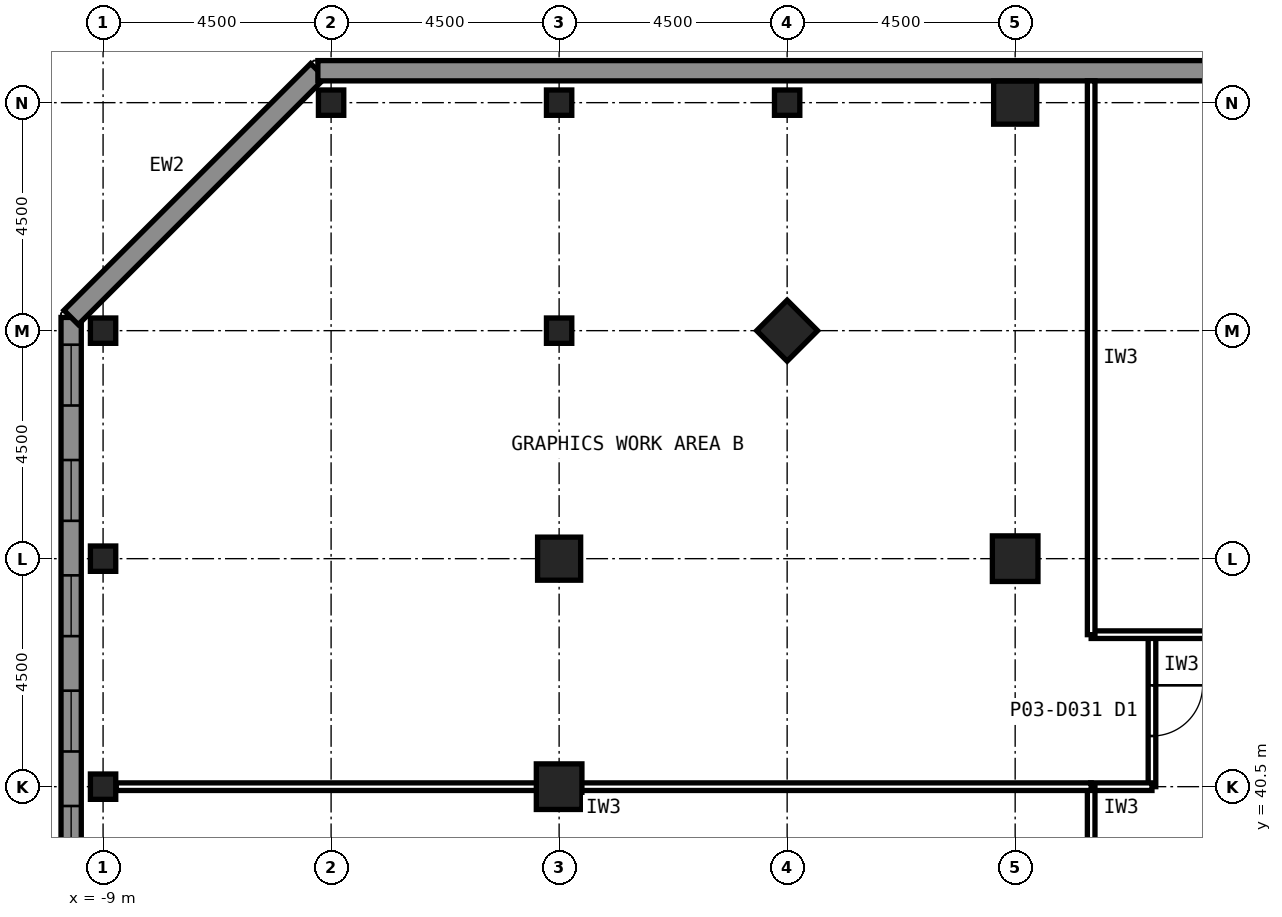
"""IFC4 building model, lengths in metres.
Left out: names, types, materials, properties, quantities, classifications, styles, units other than length and angle.
Written with IfcOpenShell. Run it as: python <this file> out.ifc"""

import sys

from ifc_helpers import new_model, si_unit, direction, frame, frame_2d, origin, origin_2d, place, context, subcontext, project, spatial, rectangle, hollow_rectangle, extrude, element, fill, save


model = new_model("IFC4")
c1 = context("Model", 3, precision=1e-05, world=origin(), true_north=direction((0.0, 1.0)))
c2 = subcontext(c1, "Body", "Model", "MODEL_VIEW")
j1 = project(units=[si_unit("LENGTHUNIT", "METRE"), si_unit("PLANEANGLEUNIT", "RADIAN")], contexts=[c1])
p1 = place(None, origin())
s1 = spatial("IfcSite", under=j1, at=p1, CompositionType="ELEMENT")
p2 = place(p1, origin())
s2 = spatial("IfcBuilding", under=s1, at=p2, CompositionType="ELEMENT")
p3 = place(p2, frame((0.0, 0.0, 12.0)))
s3 = spatial("IfcBuildingStorey", under=s2, at=p3, CompositionType="ELEMENT", Elevation=12.0)
for number, where, z_axis, x_axis in (
    (1, (9.0, 54.0, 0.0), (0.0, 0.0, 1.0), (1.0, 0.0, 0.0)),
    (2, (0.0, 45.0, 0.0), (0.0, 0.0, 1.0), (1.0, 0.0, 0.0)),
):
    element("IfcColumn", number, at=place(p3, frame(where, z_axis=z_axis, x_axis=x_axis)), inside=s3, PredefinedType="COLUMN", context=c2, shape_type="SweptSolid", body=[
        extrude(hollow_rectangle(XDim=0.85, YDim=0.85, WallThickness=0.05, at=origin_2d()), origin(), (0.0, 0.0, 1.0), 6.0),
    ])
p4 = place(p3, frame((0.0, 40.5, 0.0), z_axis=(0.0, 0.0, 1.0), x_axis=(1.0, 0.0, 0.0)))
e3 = element("IfcColumn", 3, at=p4, inside=s3, PredefinedType="COLUMN", context=c2, shape_type="SweptSolid", body=[
    extrude(hollow_rectangle(XDim=0.9, YDim=0.9, WallThickness=0.063, at=origin_2d()), origin(), (0.0, 0.0, 1.0), 6.0),
])
p5 = place(p3, frame((4.5, 49.5, 0.0), z_axis=(0.0, 0.0, 1.0), x_axis=(0.707106781187, 0.707106781187, 0.0)))
e4 = element("IfcColumn", 4, at=p5, inside=s3, PredefinedType="COLUMN", context=c2, shape_type="SweptSolid", body=[
    extrude(hollow_rectangle(XDim=0.85, YDim=0.85, WallThickness=0.05, at=origin_2d()), origin(), (0.0, 0.0, 1.0), 6.0),
])
p6 = place(p3, frame((9.0, 45.0, 0.0), z_axis=(0.0, 0.0, 1.0), x_axis=(1.0, 0.0, 0.0)))
e5 = element("IfcColumn", 5, at=p6, inside=s3, PredefinedType="COLUMN", context=c2, shape_type="SweptSolid", body=[
    extrude(hollow_rectangle(XDim=0.9, YDim=0.9, WallThickness=0.063, at=origin_2d()), origin(), (0.0, 0.0, 1.0), 6.0),
])
for number, where, z_axis, x_axis in (
    (6, (-9.0, 40.5, 0.0), (0.0, 0.0, 1.0), (1.0, 0.0, 0.0)),
    (7, (-9.0, 45.0, 0.0), (0.0, 0.0, 1.0), (1.0, 0.0, 0.0)),
    (8, (-9.0, 49.5, 0.0), (0.0, 0.0, 1.0), (1.0, 0.0, 0.0)),
    (9, (-4.5, 54.0, 0.0), (0.0, 0.0, 1.0), (1.0, 0.0, 0.0)),
    (10, (0.0, 54.0, 0.0), (0.0, 0.0, 1.0), (1.0, 0.0, 0.0)),
    (11, (4.5, 54.0, 0.0), (0.0, 0.0, 1.0), (1.0, 0.0, 0.0)),
    (12, (0.0, 49.5, 0.0), (0.0, 0.0, 1.0), (1.0, 0.0, 0.0)),
):
    element("IfcColumn", number, at=place(p3, frame(where, z_axis=z_axis, x_axis=x_axis)), inside=s3, PredefinedType="COLUMN", context=c2, shape_type="SweptSolid", body=[
        extrude(hollow_rectangle(XDim=0.5, YDim=0.5, WallThickness=0.022, at=origin_2d()), origin(), (0.0, 0.0, 1.0), 6.0),
    ])
p7 = place(p3, frame((-9.63, 4.239, 0.0), z_axis=(0.0, 0.0, 1.0), x_axis=(0.0, 1.0, 0.0)))
e13 = element("IfcWall", 13, at=p7, inside=s3, PredefinedType="SOLIDWALL", context=c2, shape_type="SweptSolid", body=[
    extrude(rectangle(XDim=45.522, YDim=0.4, at=frame_2d((22.761, 0.0))), origin(), (0.0, 0.0, 1.0), 6.0),
])
p8 = place(p7, frame((0.538, 0.0, 0.9)))
e14 = element("IfcOpeningElement", 14, at=p8, cuts=e13, PredefinedType="OPENING", context=c2, shape_type="SweptSolid", body=[
    extrude(rectangle(XDim=1.2, YDim=1.5, at=frame_2d((0.6, 0.75))), frame((0.0, 0.21, 0.0), z_axis=(0.0, -1.0, 0.0), x_axis=(1.0, 0.0, 0.0)), (0.0, 0.0, 1.0), 0.42),
])
p9 = place(p7, frame((2.814, 0.0, 0.9)))
e15 = element("IfcOpeningElement", 15, at=p9, cuts=e13, PredefinedType="OPENING", context=c2, shape_type="SweptSolid", body=[
    extrude(rectangle(XDim=1.2, YDim=1.5, at=frame_2d((0.6, 0.75))), frame((0.0, 0.21, 0.0), z_axis=(0.0, -1.0, 0.0), x_axis=(1.0, 0.0, 0.0)), (0.0, 0.0, 1.0), 0.42),
])
p10 = place(p7, frame((5.09, 0.0, 0.9)))
e16 = element("IfcOpeningElement", 16, at=p10, cuts=e13, PredefinedType="OPENING", context=c2, shape_type="SweptSolid", body=[
    extrude(rectangle(XDim=1.2, YDim=1.5, at=frame_2d((0.6, 0.75))), frame((0.0, 0.21, 0.0), z_axis=(0.0, -1.0, 0.0), x_axis=(1.0, 0.0, 0.0)), (0.0, 0.0, 1.0), 0.42),
])
p11 = place(p7, frame((7.366, 0.0, 0.9)))
e17 = element("IfcOpeningElement", 17, at=p11, cuts=e13, PredefinedType="OPENING", context=c2, shape_type="SweptSolid", body=[
    extrude(rectangle(XDim=1.2, YDim=1.5, at=frame_2d((0.6, 0.75))), frame((0.0, 0.21, 0.0), z_axis=(0.0, -1.0, 0.0), x_axis=(1.0, 0.0, 0.0)), (0.0, 0.0, 1.0), 0.42),
])
p12 = place(p7, frame((9.642, 0.0, 0.9)))
e18 = element("IfcOpeningElement", 18, at=p12, cuts=e13, PredefinedType="OPENING", context=c2, shape_type="SweptSolid", body=[
    extrude(rectangle(XDim=1.2, YDim=1.5, at=frame_2d((0.6, 0.75))), frame((0.0, 0.21, 0.0), z_axis=(0.0, -1.0, 0.0), x_axis=(1.0, 0.0, 0.0)), (0.0, 0.0, 1.0), 0.42),
])
p13 = place(p7, frame((11.918, 0.0, 0.9)))
e19 = element("IfcOpeningElement", 19, at=p13, cuts=e13, PredefinedType="OPENING", context=c2, shape_type="SweptSolid", body=[
    extrude(rectangle(XDim=1.2, YDim=1.5, at=frame_2d((0.6, 0.75))), frame((0.0, 0.21, 0.0), z_axis=(0.0, -1.0, 0.0), x_axis=(1.0, 0.0, 0.0)), (0.0, 0.0, 1.0), 0.42),
])
p14 = place(p7, frame((14.195, 0.0, 0.9)))
e20 = element("IfcOpeningElement", 20, at=p14, cuts=e13, PredefinedType="OPENING", context=c2, shape_type="SweptSolid", body=[
    extrude(rectangle(XDim=1.2, YDim=1.5, at=frame_2d((0.6, 0.75))), frame((0.0, 0.21, 0.0), z_axis=(0.0, -1.0, 0.0), x_axis=(1.0, 0.0, 0.0)), (0.0, 0.0, 1.0), 0.42),
])
p15 = place(p7, frame((16.471, 0.0, 0.9)))
e21 = element("IfcOpeningElement", 21, at=p15, cuts=e13, PredefinedType="OPENING", context=c2, shape_type="SweptSolid", body=[
    extrude(rectangle(XDim=1.2, YDim=1.5, at=frame_2d((0.6, 0.75))), frame((0.0, 0.21, 0.0), z_axis=(0.0, -1.0, 0.0), x_axis=(1.0, 0.0, 0.0)), (0.0, 0.0, 1.0), 0.42),
])
p16 = place(p7, frame((18.747, 0.0, 0.9)))
e22 = element("IfcOpeningElement", 22, at=p16, cuts=e13, PredefinedType="OPENING", context=c2, shape_type="SweptSolid", body=[
    extrude(rectangle(XDim=1.2, YDim=1.5, at=frame_2d((0.6, 0.75))), frame((0.0, 0.21, 0.0), z_axis=(0.0, -1.0, 0.0), x_axis=(1.0, 0.0, 0.0)), (0.0, 0.0, 1.0), 0.42),
])
p17 = place(p7, frame((21.023, 0.0, 0.9)))
e23 = element("IfcOpeningElement", 23, at=p17, cuts=e13, PredefinedType="OPENING", context=c2, shape_type="SweptSolid", body=[
    extrude(rectangle(XDim=1.2, YDim=1.5, at=frame_2d((0.6, 0.75))), frame((0.0, 0.21, 0.0), z_axis=(0.0, -1.0, 0.0), x_axis=(1.0, 0.0, 0.0)), (0.0, 0.0, 1.0), 0.42),
])
p18 = place(p7, frame((23.299, 0.0, 0.9)))
e24 = element("IfcOpeningElement", 24, at=p18, cuts=e13, PredefinedType="OPENING", context=c2, shape_type="SweptSolid", body=[
    extrude(rectangle(XDim=1.2, YDim=1.5, at=frame_2d((0.6, 0.75))), frame((0.0, 0.21, 0.0), z_axis=(0.0, -1.0, 0.0), x_axis=(1.0, 0.0, 0.0)), (0.0, 0.0, 1.0), 0.42),
])
p19 = place(p7, frame((25.575, 0.0, 0.9)))
e25 = element("IfcOpeningElement", 25, at=p19, cuts=e13, PredefinedType="OPENING", context=c2, shape_type="SweptSolid", body=[
    extrude(rectangle(XDim=1.2, YDim=1.5, at=frame_2d((0.6, 0.75))), frame((0.0, 0.21, 0.0), z_axis=(0.0, -1.0, 0.0), x_axis=(1.0, 0.0, 0.0)), (0.0, 0.0, 1.0), 0.42),
])
p20 = place(p7, frame((27.851, 0.0, 0.9)))
e26 = element("IfcOpeningElement", 26, at=p20, cuts=e13, PredefinedType="OPENING", context=c2, shape_type="SweptSolid", body=[
    extrude(rectangle(XDim=1.2, YDim=1.5, at=frame_2d((0.6, 0.75))), frame((0.0, 0.21, 0.0), z_axis=(0.0, -1.0, 0.0), x_axis=(1.0, 0.0, 0.0)), (0.0, 0.0, 1.0), 0.42),
])
p21 = place(p7, frame((30.127, 0.0, 0.9)))
e27 = element("IfcOpeningElement", 27, at=p21, cuts=e13, PredefinedType="OPENING", context=c2, shape_type="SweptSolid", body=[
    extrude(rectangle(XDim=1.2, YDim=1.5, at=frame_2d((0.6, 0.75))), frame((0.0, 0.21, 0.0), z_axis=(0.0, -1.0, 0.0), x_axis=(1.0, 0.0, 0.0)), (0.0, 0.0, 1.0), 0.42),
])
p22 = place(p7, frame((32.404, 0.0, 0.9)))
e28 = element("IfcOpeningElement", 28, at=p22, cuts=e13, PredefinedType="OPENING", context=c2, shape_type="SweptSolid", body=[
    extrude(rectangle(XDim=1.2, YDim=1.5, at=frame_2d((0.6, 0.75))), frame((0.0, 0.21, 0.0), z_axis=(0.0, -1.0, 0.0), x_axis=(1.0, 0.0, 0.0)), (0.0, 0.0, 1.0), 0.42),
])
p23 = place(p7, frame((34.679, 0.0, 0.9)))
e29 = element("IfcOpeningElement", 29, at=p23, cuts=e13, PredefinedType="OPENING", context=c2, shape_type="SweptSolid", body=[
    extrude(rectangle(XDim=1.2, YDim=1.5, at=frame_2d((0.6, 0.75))), frame((0.0, 0.21, 0.0), z_axis=(0.0, -1.0, 0.0), x_axis=(1.0, 0.0, 0.0)), (0.0, 0.0, 1.0), 0.42),
])
p24 = place(p7, frame((36.956, 0.0, 0.9)))
e30 = element("IfcOpeningElement", 30, at=p24, cuts=e13, PredefinedType="OPENING", context=c2, shape_type="SweptSolid", body=[
    extrude(rectangle(XDim=1.2, YDim=1.5, at=frame_2d((0.6, 0.75))), frame((0.0, 0.21, 0.0), z_axis=(0.0, -1.0, 0.0), x_axis=(1.0, 0.0, 0.0)), (0.0, 0.0, 1.0), 0.42),
])
p25 = place(p7, frame((39.232, 0.0, 0.9)))
e31 = element("IfcOpeningElement", 31, at=p25, cuts=e13, PredefinedType="OPENING", context=c2, shape_type="SweptSolid", body=[
    extrude(rectangle(XDim=1.2, YDim=1.5, at=frame_2d((0.6, 0.75))), frame((0.0, 0.21, 0.0), z_axis=(0.0, -1.0, 0.0), x_axis=(1.0, 0.0, 0.0)), (0.0, 0.0, 1.0), 0.42),
])
p26 = place(p7, frame((41.508, 0.0, 0.9)))
e32 = element("IfcOpeningElement", 32, at=p26, cuts=e13, PredefinedType="OPENING", context=c2, shape_type="SweptSolid", body=[
    extrude(rectangle(XDim=1.2, YDim=1.5, at=frame_2d((0.6, 0.75))), frame((0.0, 0.21, 0.0), z_axis=(0.0, -1.0, 0.0), x_axis=(1.0, 0.0, 0.0)), (0.0, 0.0, 1.0), 0.42),
])
p27 = place(p7, frame((43.784, 0.0, 0.9)))
e33 = element("IfcOpeningElement", 33, at=p27, cuts=e13, PredefinedType="OPENING", context=c2, shape_type="SweptSolid", body=[
    extrude(rectangle(XDim=1.2, YDim=1.5, at=frame_2d((0.6, 0.75))), frame((0.0, 0.21, 0.0), z_axis=(0.0, -1.0, 0.0), x_axis=(1.0, 0.0, 0.0)), (0.0, 0.0, 1.0), 0.42),
])
p28 = place(p3, frame((-9.63, 49.761, 0.0), z_axis=(0.0, 0.0, 1.0), x_axis=(0.707106781187, 0.707106781187, 0.0)))
e34 = element("IfcWall", 34, at=p28, inside=s3, PredefinedType="SOLIDWALL", context=c2, shape_type="SweptSolid", body=[
    extrude(rectangle(XDim=6.886, YDim=0.4, at=frame_2d((3.443, 0.0))), origin(), (0.0, 0.0, 1.0), 6.0),
])
p29 = place(p3, frame((-4.761, 54.63, 0.0), z_axis=(0.0, 0.0, 1.0), x_axis=(1.0, 0.0, 0.0)))
e35 = element("IfcWall", 35, at=p29, inside=s3, PredefinedType="SOLIDWALL", context=c2, shape_type="SweptSolid", body=[
    extrude(rectangle(XDim=63.522, YDim=0.4, at=frame_2d((31.761, 0.0))), origin(), (0.0, 0.0, 1.0), 6.0),
])
p30 = place(p3, frame((11.7, 43.5, 0.0), z_axis=(0.0, 0.0, 1.0), x_axis=(0.0, -1.0, 0.0)))
e36 = element("IfcWall", 36, at=p30, inside=s3, PredefinedType="PARTITIONING", context=c2, shape_type="SweptSolid", body=[
    extrude(rectangle(XDim=3.0, YDim=0.15, at=frame_2d((1.5, 0.0))), origin(), (0.0, 0.0, 1.0), 5.8),
])
p31 = place(p30, frame((1.0, 0.0, 0.0)))
e37 = element("IfcOpeningElement", 37, at=p31, cuts=e36, PredefinedType="OPENING", context=c2, shape_type="SweptSolid", body=[
    extrude(rectangle(XDim=1.0, YDim=2.1, at=frame_2d((0.5, 1.05))), frame((0.0, 0.085, 0.0), z_axis=(0.0, -1.0, 0.0), x_axis=(1.0, 0.0, 0.0)), (0.0, 0.0, 1.0), 0.17),
])
p32 = place(p3, frame((11.7, 40.5, 0.0), z_axis=(0.0, 0.0, 1.0), x_axis=(-1.0, 0.0, 0.0)))
e38 = element("IfcWall", 38, at=p32, inside=s3, PredefinedType="PARTITIONING", context=c2, shape_type="SweptSolid", body=[
    extrude(rectangle(XDim=1.21, YDim=0.15, at=frame_2d((0.605, 0.0))), origin(), (0.0, 0.0, 1.0), 4.949),
])
p33 = place(p3, frame((10.5, 43.5, 0.0), z_axis=(0.0, 0.0, 1.0), x_axis=(1.0, 0.0, 0.0)))
e39 = element("IfcWall", 39, at=p33, inside=s3, PredefinedType="PARTITIONING", context=c2, shape_type="SweptSolid", body=[
    extrude(rectangle(XDim=33.0, YDim=0.15, at=frame_2d((16.5, 0.0))), origin(), (0.0, 0.0, 1.0), 5.8),
])
p34 = place(p33, frame((16.0, 0.0, 0.0)))
e40 = element("IfcOpeningElement", 40, at=p34, cuts=e39, PredefinedType="OPENING", context=c2, shape_type="SweptSolid", body=[
    extrude(rectangle(XDim=1.0, YDim=2.1, at=frame_2d((0.5, 1.05))), frame((0.0, 0.085, 0.0), z_axis=(0.0, -1.0, 0.0), x_axis=(1.0, 0.0, 0.0)), (0.0, 0.0, 1.0), 0.17),
])
p35 = place(p3, frame((10.5, 54.43, 0.0), z_axis=(0.0, 0.0, 1.0), x_axis=(0.0, -1.0, 0.0)))
e41 = element("IfcWall", 41, at=p35, inside=s3, PredefinedType="PARTITIONING", context=c2, shape_type="SweptSolid", body=[
    extrude(rectangle(XDim=10.93, YDim=0.15, at=frame_2d((5.465, 0.0))), origin(), (0.0, 0.0, 1.0), 5.8),
])
p36 = place(p3, frame((10.5, 13.5, 0.0), z_axis=(0.0, 0.0, 1.0), x_axis=(0.0, 1.0, 0.0)))
e42 = element("IfcWall", 42, at=p36, inside=s3, PredefinedType="PARTITIONING", context=c2, shape_type="SweptSolid", body=[
    extrude(rectangle(XDim=27.0, YDim=0.15, at=frame_2d((13.5, 0.0))), origin(), (0.0, 0.0, 1.0), 5.8),
])
p37 = place(p36, frame((13.0, 0.0, 0.0)))
e43 = element("IfcOpeningElement", 43, at=p37, cuts=e42, PredefinedType="OPENING", context=c2, shape_type="SweptSolid", body=[
    extrude(rectangle(XDim=1.0, YDim=2.1, at=frame_2d((0.5, 1.05))), frame((0.0, 0.085, 0.0), z_axis=(0.0, -1.0, 0.0), x_axis=(1.0, 0.0, 0.0)), (0.0, 0.0, 1.0), 0.17),
])
p38 = place(p3, frame((10.5, 40.5, 0.0), z_axis=(0.0, 0.0, 1.0), x_axis=(-1.0, 0.0, 0.0)))
e44 = element("IfcWall", 44, at=p38, inside=s3, PredefinedType="PARTITIONING", context=c2, shape_type="SweptSolid", body=[
    extrude(rectangle(XDim=19.24, YDim=0.15, at=frame_2d((9.62, 0.0))), origin(), (0.0, 0.0, 1.0), 4.949),
])
p39 = place(p23, origin())
e45 = element("IfcWindow", 45, at=p39, inside=s3, PartitioningType="SINGLE_PANEL", PredefinedType="WINDOW", context=c2, shape_type="SweptSolid", body=[
    extrude(rectangle(XDim=1.2, YDim=1.5, at=frame_2d((0.6, 0.75))), frame((0.0, 0.03, 0.0), z_axis=(0.0, -1.0, 0.0), x_axis=(1.0, 0.0, 0.0)), (0.0, 0.0, 1.0), 0.06),
])
fill(e29, e45)
p40 = place(p24, origin())
e46 = element("IfcWindow", 46, at=p40, inside=s3, PartitioningType="SINGLE_PANEL", PredefinedType="WINDOW", context=c2, shape_type="SweptSolid", body=[
    extrude(rectangle(XDim=1.2, YDim=1.5, at=frame_2d((0.6, 0.75))), frame((0.0, 0.03, 0.0), z_axis=(0.0, -1.0, 0.0), x_axis=(1.0, 0.0, 0.0)), (0.0, 0.0, 1.0), 0.06),
])
fill(e30, e46)
p41 = place(p25, origin())
e47 = element("IfcWindow", 47, at=p41, inside=s3, PartitioningType="SINGLE_PANEL", PredefinedType="WINDOW", context=c2, shape_type="SweptSolid", body=[
    extrude(rectangle(XDim=1.2, YDim=1.5, at=frame_2d((0.6, 0.75))), frame((0.0, 0.03, 0.0), z_axis=(0.0, -1.0, 0.0), x_axis=(1.0, 0.0, 0.0)), (0.0, 0.0, 1.0), 0.06),
])
fill(e31, e47)
p42 = place(p26, origin())
e48 = element("IfcWindow", 48, at=p42, inside=s3, PartitioningType="SINGLE_PANEL", PredefinedType="WINDOW", context=c2, shape_type="SweptSolid", body=[
    extrude(rectangle(XDim=1.2, YDim=1.5, at=frame_2d((0.6, 0.75))), frame((0.0, 0.03, 0.0), z_axis=(0.0, -1.0, 0.0), x_axis=(1.0, 0.0, 0.0)), (0.0, 0.0, 1.0), 0.06),
])
fill(e32, e48)
p43 = place(p27, origin())
e49 = element("IfcWindow", 49, at=p43, inside=s3, PartitioningType="SINGLE_PANEL", PredefinedType="WINDOW", context=c2, shape_type="SweptSolid", body=[
    extrude(rectangle(XDim=1.2, YDim=1.5, at=frame_2d((0.6, 0.75))), frame((0.0, 0.03, 0.0), z_axis=(0.0, -1.0, 0.0), x_axis=(1.0, 0.0, 0.0)), (0.0, 0.0, 1.0), 0.06),
])
fill(e33, e49)
p44 = place(p31, origin())
e50 = element("IfcDoor", 50, at=p44, inside=s3, OperationType="SINGLE_SWING_LEFT", PredefinedType="DOOR", context=c2, shape_type="SweptSolid", body=[
    extrude(rectangle(XDim=1.0, YDim=2.1, at=frame_2d((0.5, 1.05))), frame((0.0, 0.025, 0.0), z_axis=(0.0, -1.0, 0.0), x_axis=(1.0, 0.0, 0.0)), (0.0, 0.0, 1.0), 0.05),
])
fill(e37, e50)
save(model, sys.argv[1])
